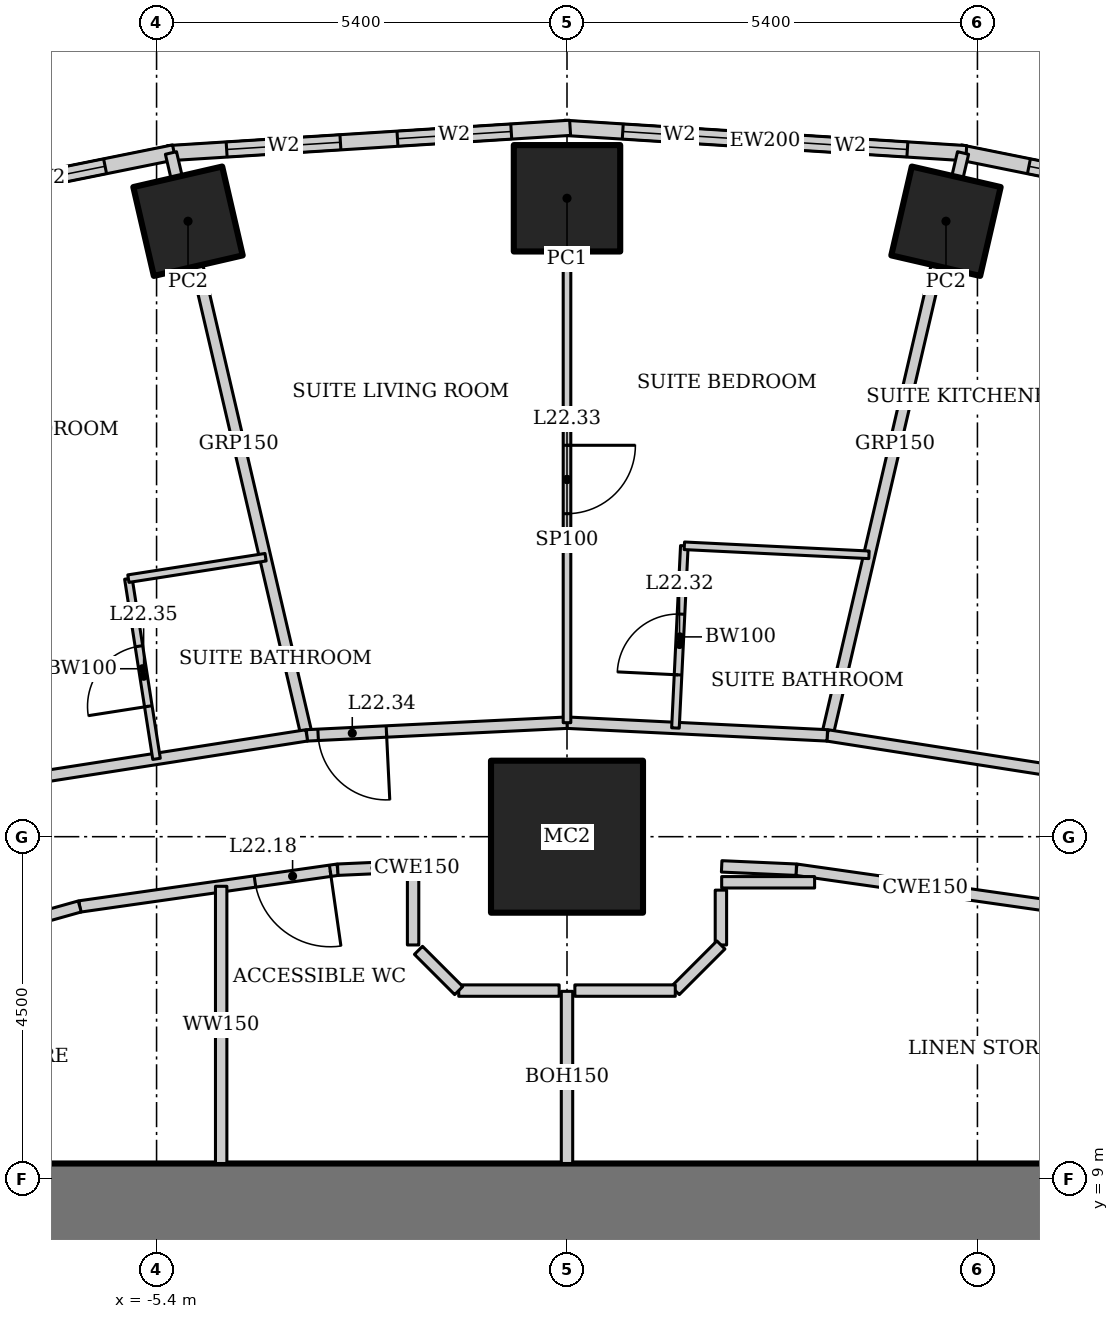
"""IFC4 building model, lengths in metres.
Left out: names, types, materials, properties, quantities, classifications, styles, units other than length and angle.
Written with IfcOpenShell. Run it as: python <this file> out.ifc"""

import sys

from ifc_helpers import new_model, si_unit, direction, frame, frame_2d, origin, origin_2d, place, context, subcontext, project, spatial, rectangle, hollow_rectangle, extrude, element, fill, save


model = new_model("IFC4")
c1 = context("Model", 3, precision=1e-05, world=origin(), true_north=direction((0.0, 1.0)))
c2 = subcontext(c1, "Body", "Model", "MODEL_VIEW")
j1 = project(units=[si_unit("LENGTHUNIT", "METRE"), si_unit("PLANEANGLEUNIT", "RADIAN")], contexts=[c1])
p1 = place(None, origin())
s1 = spatial("IfcSite", under=j1, at=p1, CompositionType="ELEMENT")
p2 = place(p1, origin())
s2 = spatial("IfcBuilding", under=s1, at=p2, CompositionType="ELEMENT")
p3 = place(p2, frame((0.0, 0.0, 94.6)))
s3 = spatial("IfcBuildingStorey", under=s2, at=p3, CompositionType="ELEMENT", Elevation=94.6)
p4 = place(p3, frame((0.0, 13.5, 0.0), z_axis=(0.0, 0.0, 1.0), x_axis=(1.0, 0.0, 0.0)))
e1 = element("IfcColumn", 1, at=p4, inside=s3, PredefinedType="COLUMN", context=c2, shape_type="SweptSolid", body=[
    extrude(hollow_rectangle(XDim=2.0, YDim=2.0, WallThickness=0.17, at=origin_2d()), origin(), (0.0, 0.0, 1.0), 3.6),
])
p5 = place(p3, frame((4.986, 21.598, 0.0), z_axis=(0.0, 0.0, 1.0), x_axis=(0.224951054344, 0.974370064785, 0.0)))
e2 = element("IfcColumn", 2, at=p5, inside=s3, PredefinedType="COLUMN", context=c2, shape_type="SweptSolid", body=[
    extrude(hollow_rectangle(XDim=1.2, YDim=1.2, WallThickness=0.1, at=origin_2d()), origin(), (0.0, 0.0, 1.0), 3.6),
])
p6 = place(p3, frame((0.0, 21.9, 0.0), z_axis=(0.0, 0.0, 1.0), x_axis=(1.0, 0.0, 0.0)))
e3 = element("IfcColumn", 3, at=p6, inside=s3, PredefinedType="COLUMN", context=c2, shape_type="SweptSolid", body=[
    extrude(hollow_rectangle(XDim=1.4, YDim=1.4, WallThickness=0.1, at=origin_2d()), origin(), (0.0, 0.0, 1.0), 3.6),
])
p7 = place(p3, frame((-4.986, 21.598, 0.0), z_axis=(0.0, 0.0, 1.0), x_axis=(0.974370064785, 0.224951054344, 0.0)))
e4 = element("IfcColumn", 4, at=p7, inside=s3, PredefinedType="COLUMN", context=c2, shape_type="SweptSolid", body=[
    extrude(hollow_rectangle(XDim=1.2, YDim=1.2, WallThickness=0.1, at=origin_2d()), origin(), (0.0, 0.0, 1.0), 3.6),
])
p8 = place(p3, frame((12.2, 8.0, 0.0), z_axis=(0.0, 0.0, 1.0), x_axis=(-1.0, 0.0, 0.0)))
e5 = element("IfcWall", 5, at=p8, inside=s3, PredefinedType="SHEAR", context=c2, shape_type="SweptSolid", body=[
    extrude(rectangle(XDim=24.4, YDim=2.4, at=frame_2d((12.2, 0.0))), origin(), (0.0, 0.0, 1.0), 3.6),
])
p9 = place(p3, frame((10.957, 21.337, 0.0), z_axis=(0.0, 0.0, 1.0), x_axis=(-0.980251657452, 0.197754110105, 0.0)))
e6 = element("IfcWall", 6, at=p9, inside=s3, PredefinedType="SOLIDWALL", context=c2, shape_type="SweptSolid", body=[
    extrude(rectangle(XDim=5.904, YDim=0.2, at=frame_2d((2.952, 0.0))), origin(), (0.0, 0.0, 1.0), 3.45),
])
p10 = place(p9, frame((0.926, 0.0, 0.5)))
e7 = element("IfcOpeningElement", 7, at=p10, cuts=e6, PredefinedType="OPENING", context=c2, shape_type="SweptSolid", body=[
    extrude(rectangle(XDim=1.5, YDim=2.2, at=frame_2d((0.75, 1.1))), frame((0.0, 0.11, 0.0), z_axis=(0.0, -1.0, 0.0), x_axis=(1.0, 0.0, 0.0)), (0.0, 0.0, 1.0), 0.22),
])
p11 = place(p9, frame((3.478, 0.0, 0.5)))
e8 = element("IfcOpeningElement", 8, at=p11, cuts=e6, PredefinedType="OPENING", context=c2, shape_type="SweptSolid", body=[
    extrude(rectangle(XDim=1.5, YDim=2.2, at=frame_2d((0.75, 1.1))), frame((0.0, 0.11, 0.0), z_axis=(0.0, -1.0, 0.0), x_axis=(1.0, 0.0, 0.0)), (0.0, 0.0, 1.0), 0.22),
])
p12 = place(p3, frame((5.253, 22.493, 0.0), z_axis=(0.0, 0.0, 1.0), x_axis=(-0.998018582375, 0.062919863585, 0.0)))
e9 = element("IfcWall", 9, at=p12, inside=s3, PredefinedType="SOLIDWALL", context=c2, shape_type="SweptSolid", body=[
    extrude(rectangle(XDim=5.304, YDim=0.2, at=frame_2d((2.652, 0.0))), origin(), (0.0, 0.0, 1.0), 3.45),
])
p13 = place(p12, frame((0.776, 0.0, 0.5)))
e10 = element("IfcOpeningElement", 10, at=p13, cuts=e9, PredefinedType="OPENING", context=c2, shape_type="SweptSolid", body=[
    extrude(rectangle(XDim=1.5, YDim=2.2, at=frame_2d((0.75, 1.1))), frame((0.0, 0.11, 0.0), z_axis=(0.0, -1.0, 0.0), x_axis=(1.0, 0.0, 0.0)), (0.0, 0.0, 1.0), 0.22),
])
p14 = place(p12, frame((3.028, 0.0, 0.5)))
e11 = element("IfcOpeningElement", 11, at=p14, cuts=e9, PredefinedType="OPENING", context=c2, shape_type="SweptSolid", body=[
    extrude(rectangle(XDim=1.5, YDim=2.2, at=frame_2d((0.75, 1.1))), frame((0.0, 0.11, 0.0), z_axis=(0.0, -1.0, 0.0), x_axis=(1.0, 0.0, 0.0)), (0.0, 0.0, 1.0), 0.22),
])
p15 = place(p3, frame((0.041, 22.827, 0.0), z_axis=(0.0, 0.0, 1.0), x_axis=(-0.998018582375, -0.062919863585, 0.0)))
e12 = element("IfcWall", 12, at=p15, inside=s3, PredefinedType="SOLIDWALL", context=c2, shape_type="SweptSolid", body=[
    extrude(rectangle(XDim=5.304, YDim=0.2, at=frame_2d((2.652, 0.0))), origin(), (0.0, 0.0, 1.0), 3.45),
])
p16 = place(p15, frame((0.776, 0.0, 0.5)))
e13 = element("IfcOpeningElement", 13, at=p16, cuts=e12, PredefinedType="OPENING", context=c2, shape_type="SweptSolid", body=[
    extrude(rectangle(XDim=1.5, YDim=2.2, at=frame_2d((0.75, 1.1))), frame((0.0, 0.11, 0.0), z_axis=(0.0, -1.0, 0.0), x_axis=(1.0, 0.0, 0.0)), (0.0, 0.0, 1.0), 0.22),
])
p17 = place(p15, frame((3.028, 0.0, 0.5)))
e14 = element("IfcOpeningElement", 14, at=p17, cuts=e12, PredefinedType="OPENING", context=c2, shape_type="SweptSolid", body=[
    extrude(rectangle(XDim=1.5, YDim=2.2, at=frame_2d((0.75, 1.1))), frame((0.0, 0.11, 0.0), z_axis=(0.0, -1.0, 0.0), x_axis=(1.0, 0.0, 0.0)), (0.0, 0.0, 1.0), 0.22),
])
p18 = place(p3, frame((-5.17, 22.504, 0.0), z_axis=(0.0, 0.0, 1.0), x_axis=(-0.980251657452, -0.197754110105, 0.0)))
e15 = element("IfcWall", 15, at=p18, inside=s3, PredefinedType="SOLIDWALL", context=c2, shape_type="SweptSolid", body=[
    extrude(rectangle(XDim=5.904, YDim=0.2, at=frame_2d((2.952, 0.0))), origin(), (0.0, 0.0, 1.0), 3.45),
])
p19 = place(p18, frame((0.926, 0.0, 0.5)))
e16 = element("IfcOpeningElement", 16, at=p19, cuts=e15, PredefinedType="OPENING", context=c2, shape_type="SweptSolid", body=[
    extrude(rectangle(XDim=1.5, YDim=2.2, at=frame_2d((0.75, 1.1))), frame((0.0, 0.11, 0.0), z_axis=(0.0, -1.0, 0.0), x_axis=(1.0, 0.0, 0.0)), (0.0, 0.0, 1.0), 0.22),
])
p20 = place(p18, frame((3.478, 0.0, 0.5)))
e17 = element("IfcOpeningElement", 17, at=p20, cuts=e15, PredefinedType="OPENING", context=c2, shape_type="SweptSolid", body=[
    extrude(rectangle(XDim=1.5, YDim=2.2, at=frame_2d((0.75, 1.1))), frame((0.0, 0.11, 0.0), z_axis=(0.0, -1.0, 0.0), x_axis=(1.0, 0.0, 0.0)), (0.0, 0.0, 1.0), 0.22),
])
for number, where, z_axis, x_axis in (
    (18, (5.211, 22.496, 0.0), (0.0, 0.0, 1.0), (-0.227, -0.974, 0.0)),
    (19, (-5.211, 22.496, 0.0), (0.0, 0.0, 1.0), (0.227, -0.974, 0.0)),
):
    element("IfcWall", number, at=place(p3, frame(where, z_axis=z_axis, x_axis=x_axis)), inside=s3, PredefinedType="PARTITIONING", context=c2, shape_type="SweptSolid", body=[
        extrude(rectangle(XDim=7.869, YDim=0.15, at=frame_2d((3.934, 0.0))), origin(), (0.0, 0.0, 1.0), 2.767),
    ])
p21 = place(p3, frame((7.253, 14.235, 0.0), z_axis=(0.0, 0.0, 1.0), x_axis=(-0.988015036573, 0.154357660987, 0.0)))
e20 = element("IfcWall", 20, at=p21, inside=s3, PredefinedType="PARTITIONING", context=c2, shape_type="SweptSolid", body=[
    extrude(rectangle(XDim=3.875, YDim=0.15, at=frame_2d((1.938, 0.0))), origin(), (0.0, 0.0, 1.0), 3.45),
])
p22 = place(p3, frame((3.424, 14.833, 0.0), z_axis=(0.0, 0.0, 1.0), x_axis=(-0.998809560203, 0.048779733975, 0.0)))
e21 = element("IfcWall", 21, at=p22, inside=s3, PredefinedType="PARTITIONING", context=c2, shape_type="SweptSolid", body=[
    extrude(rectangle(XDim=3.428, YDim=0.15, at=frame_2d((1.714, 0.0))), origin(), (0.0, 0.0, 1.0), 3.45),
])
p23 = place(p3, frame((0.0, 15.0, 0.0), z_axis=(0.0, 0.0, 1.0), x_axis=(-0.998809560203, -0.048779733975, 0.0)))
e22 = element("IfcWall", 22, at=p23, inside=s3, PredefinedType="PARTITIONING", context=c2, shape_type="SweptSolid", body=[
    extrude(rectangle(XDim=3.428, YDim=0.15, at=frame_2d((1.714, 0.0))), origin(), (0.0, 0.0, 1.0), 3.45),
])
p24 = place(p23, frame((2.378, 0.0, 0.0)))
e23 = element("IfcOpeningElement", 23, at=p24, cuts=e22, PredefinedType="OPENING", context=c2, shape_type="SweptSolid", body=[
    extrude(rectangle(XDim=0.9, YDim=2.1, at=frame_2d((0.45, 1.05))), frame((0.0, 0.085, 0.0), z_axis=(0.0, -1.0, 0.0), x_axis=(1.0, 0.0, 0.0)), (0.0, 0.0, 1.0), 0.17),
])
p25 = place(p3, frame((-3.424, 14.833, 0.0), z_axis=(0.0, 0.0, 1.0), x_axis=(-0.988015036573, -0.154357660987, 0.0)))
e24 = element("IfcWall", 24, at=p25, inside=s3, PredefinedType="PARTITIONING", context=c2, shape_type="SweptSolid", body=[
    extrude(rectangle(XDim=3.875, YDim=0.15, at=frame_2d((1.938, 0.0))), origin(), (0.0, 0.0, 1.0), 3.45),
])
p26 = place(p3, frame((6.411, 12.582, 0.0), z_axis=(0.0, 0.0, 1.0), x_axis=(-0.990002114939, 0.14105251652, 0.0)))
e25 = element("IfcWall", 25, at=p26, inside=s3, PredefinedType="PARTITIONING", context=c2, shape_type="SweptSolid", body=[
    extrude(rectangle(XDim=3.429, YDim=0.15, at=frame_2d((1.714, 0.0))), origin(), (0.0, 0.0, 1.0), 3.45),
])
p27 = place(p3, frame((-3.016, 13.066, 0.0), z_axis=(0.0, 0.0, 1.0), x_axis=(-0.990002114939, -0.14105251652, 0.0)))
e26 = element("IfcWall", 26, at=p27, inside=s3, PredefinedType="PARTITIONING", context=c2, shape_type="SweptSolid", body=[
    extrude(rectangle(XDim=3.429, YDim=0.15, at=frame_2d((1.714, 0.0))), origin(), (0.0, 0.0, 1.0), 3.45),
])
p28 = place(p27, frame((0.1, 0.0, 0.0)))
e27 = element("IfcOpeningElement", 27, at=p28, cuts=e26, PredefinedType="OPENING", context=c2, shape_type="SweptSolid", body=[
    extrude(rectangle(XDim=1.0, YDim=2.1, at=frame_2d((0.5, 1.05))), frame((0.0, 0.085, 0.0), z_axis=(0.0, -1.0, 0.0), x_axis=(1.0, 0.0, 0.0)), (0.0, 0.0, 1.0), 0.17),
])
p29 = place(p3, frame((-6.411, 12.582, 0.0), z_axis=(0.0, 0.0, 1.0), x_axis=(-0.962643729928, -0.270771211967, 0.0)))
e28 = element("IfcWall", 28, at=p29, inside=s3, PredefinedType="PARTITIONING", context=c2, shape_type="SweptSolid", body=[
    extrude(rectangle(XDim=4.688, YDim=0.15, at=frame_2d((2.344, 0.0))), origin(), (0.0, 0.0, 1.0), 3.45),
])
p30 = place(p29, frame((1.894, 0.0, 0.0)))
e29 = element("IfcOpeningElement", 29, at=p30, cuts=e28, PredefinedType="OPENING", context=c2, shape_type="SweptSolid", body=[
    extrude(rectangle(XDim=0.9, YDim=2.1, at=frame_2d((0.45, 1.05))), frame((0.0, 0.085, 0.0), z_axis=(0.0, -1.0, 0.0), x_axis=(1.0, 0.0, 0.0)), (0.0, 0.0, 1.0), 0.17),
])
p31 = place(p3, frame((-4.55, 9.2, 0.0), z_axis=(0.0, 0.0, 1.0), x_axis=(0.0, 1.0, 0.0)))
e30 = element("IfcWall", 30, at=p31, inside=s3, PredefinedType="SOLIDWALL", context=c2, shape_type="SweptSolid", body=[
    extrude(rectangle(XDim=3.647, YDim=0.15, at=frame_2d((1.824, 0.0))), origin(), (0.0, 0.0, 1.0), 3.45),
])
p32 = place(p3, frame((1.427, 14.93, 0.0), z_axis=(0.0, 0.0, 1.0), x_axis=(0.048831470304, 0.998807032168, 0.0)))
e31 = element("IfcWall", 31, at=p32, inside=s3, PredefinedType="PARTITIONING", context=c2, shape_type="SweptSolid", body=[
    extrude(rectangle(XDim=2.4, YDim=0.1, at=frame_2d((1.2, 0.0))), origin(), (0.0, 0.0, 1.0), 3.45),
])
p33 = place(p32, frame((0.7, 0.0, 0.0)))
e32 = element("IfcOpeningElement", 32, at=p33, cuts=e31, PredefinedType="OPENING", context=c2, shape_type="SweptSolid", body=[
    extrude(rectangle(XDim=0.8, YDim=2.1, at=frame_2d((0.4, 1.05))), frame((0.0, 0.06, 0.0), z_axis=(0.0, -1.0, 0.0), x_axis=(1.0, 0.0, 0.0)), (0.0, 0.0, 1.0), 0.12),
])
p34 = place(p3, frame((1.544, 17.327, 0.0), z_axis=(0.0, 0.0, 1.0), x_axis=(0.998813899717, -0.048690797202, 0.0)))
e33 = element("IfcWall", 33, at=p34, inside=s3, PredefinedType="PARTITIONING", context=c2, shape_type="SweptSolid", body=[
    extrude(rectangle(XDim=2.432, YDim=0.1, at=frame_2d((1.216, 0.0))), origin(), (0.0, 0.0, 1.0), 3.45),
])
p35 = place(p3, frame((0.0, 21.4, 0.0), z_axis=(0.0, 0.0, 1.0), x_axis=(0.0, -1.0, 0.0)))
e34 = element("IfcWall", 34, at=p35, inside=s3, PredefinedType="PARTITIONING", context=c2, shape_type="SweptSolid", body=[
    extrude(rectangle(XDim=6.4, YDim=0.1, at=frame_2d((3.2, 0.0))), origin(), (0.0, 0.0, 1.0), 2.924),
])
p36 = place(p35, frame((2.75, 0.0, 0.0)))
e35 = element("IfcOpeningElement", 35, at=p36, cuts=e34, PredefinedType="OPENING", context=c2, shape_type="SweptSolid", body=[
    extrude(rectangle(XDim=0.9, YDim=2.1, at=frame_2d((0.45, 1.05))), frame((0.0, 0.06, 0.0), z_axis=(0.0, -1.0, 0.0), x_axis=(1.0, 0.0, 0.0)), (0.0, 0.0, 1.0), 0.12),
])
p37 = place(p3, frame((-5.4, 14.524, 0.0), z_axis=(0.0, 0.0, 1.0), x_axis=(-0.154426532979, 0.988004274238, 0.0)))
e36 = element("IfcWall", 36, at=p37, inside=s3, PredefinedType="PARTITIONING", context=c2, shape_type="SweptSolid", body=[
    extrude(rectangle(XDim=2.4, YDim=0.1, at=frame_2d((1.2, 0.0))), origin(), (0.0, 0.0, 1.0), 3.45),
])
p38 = place(p37, frame((0.7, 0.0, 0.0)))
e37 = element("IfcOpeningElement", 37, at=p38, cuts=e36, PredefinedType="OPENING", context=c2, shape_type="SweptSolid", body=[
    extrude(rectangle(XDim=0.8, YDim=2.1, at=frame_2d((0.4, 1.05))), frame((0.0, 0.06, 0.0), z_axis=(0.0, -1.0, 0.0), x_axis=(1.0, 0.0, 0.0)), (0.0, 0.0, 1.0), 0.12),
])
p39 = place(p3, frame((-5.771, 16.895, 0.0), z_axis=(0.0, 0.0, 1.0), x_axis=(0.98801840204, 0.154336117711, 0.0)))
e38 = element("IfcWall", 38, at=p39, inside=s3, PredefinedType="PARTITIONING", context=c2, shape_type="SweptSolid", body=[
    extrude(rectangle(XDim=1.827, YDim=0.1, at=frame_2d((0.914, 0.0))), origin(), (0.0, 0.0, 1.0), 3.45),
])
for number, where, z_axis, x_axis in (
    (39, (3.016, 13.066, 0.0), (0.0, 0.0, 1.0), (-0.999, 0.044, 0.0)),
    (40, (-2.035, 13.109, 0.0), (0.0, 0.0, 1.0), (-0.999, -0.044, 0.0)),
):
    element("IfcWall", number, at=place(p3, frame(where, z_axis=z_axis, x_axis=x_axis)), inside=s3, PredefinedType="PARTITIONING", context=c2, shape_type="SweptSolid", body=[
        extrude(rectangle(XDim=0.982, YDim=0.15, at=frame_2d((0.491, 0.0))), origin(), (0.0, 0.0, 1.0), 3.45),
    ])
p40 = place(p3, frame((0.0, 9.2, 0.0), z_axis=(0.0, 0.0, 1.0), x_axis=(0.0, 1.0, 0.0)))
e41 = element("IfcWall", 41, at=p40, inside=s3, PredefinedType="PARTITIONING", context=c2, shape_type="SweptSolid", body=[
    extrude(rectangle(XDim=2.265, YDim=0.15, at=frame_2d((1.133, 0.0))), origin(), (0.0, 0.0, 1.0), 3.043),
])
p41 = place(p3, frame((3.258, 12.9, 0.0), z_axis=(0.0, 0.0, 1.0), x_axis=(-1.0, 0.0, 0.0)))
e42 = element("IfcWall", 42, at=p41, inside=s3, PredefinedType="PARTITIONING", context=c2, shape_type="SweptSolid", body=[
    extrude(rectangle(XDim=1.223, YDim=0.15, at=frame_2d((0.611, 0.0))), origin(), (0.0, 0.0, 1.0), 3.45),
])
p42 = place(p3, frame((2.025, 12.797, 0.0), z_axis=(0.0, 0.0, 1.0), x_axis=(0.0, -1.0, 0.0)))
e43 = element("IfcWall", 43, at=p42, inside=s3, PredefinedType="PARTITIONING", context=c2, shape_type="SweptSolid", body=[
    extrude(rectangle(XDim=0.721, YDim=0.15, at=frame_2d((0.361, 0.0))), origin(), (0.0, 0.0, 1.0), 2.749),
])
p43 = place(p3, frame((2.025, 12.075, 0.0), z_axis=(0.0, 0.0, 1.0), x_axis=(-0.707106781187, -0.707106781187, 0.0)))
e44 = element("IfcWall", 44, at=p43, inside=s3, PredefinedType="PARTITIONING", context=c2, shape_type="SweptSolid", body=[
    extrude(rectangle(XDim=0.849, YDim=0.15, at=frame_2d((0.425, 0.0))), origin(), (0.0, 0.0, 1.0), 3.45),
])
p44 = place(p3, frame((1.425, 11.475, 0.0), z_axis=(0.0, 0.0, 1.0), x_axis=(-1.0, 0.0, 0.0)))
e45 = element("IfcWall", 45, at=p44, inside=s3, PredefinedType="PARTITIONING", context=c2, shape_type="SweptSolid", body=[
    extrude(rectangle(XDim=1.321, YDim=0.15, at=frame_2d((0.661, 0.0))), origin(), (0.0, 0.0, 1.0), 3.45),
])
p45 = place(p3, frame((-2.025, 12.075, 0.0), z_axis=(0.0, 0.0, 1.0), x_axis=(0.0, 1.0, 0.0)))
e46 = element("IfcWall", 46, at=p45, inside=s3, PredefinedType="PARTITIONING", context=c2, shape_type="SweptSolid", body=[
    extrude(rectangle(XDim=0.93, YDim=0.15, at=frame_2d((0.465, 0.0))), origin(), (0.0, 0.0, 1.0), 2.749),
])
p46 = place(p3, frame((-0.103, 11.475, 0.0), z_axis=(0.0, 0.0, 1.0), x_axis=(-1.0, 0.0, 0.0)))
e47 = element("IfcWall", 47, at=p46, inside=s3, PredefinedType="PARTITIONING", context=c2, shape_type="SweptSolid", body=[
    extrude(rectangle(XDim=1.321, YDim=0.15, at=frame_2d((0.661, 0.0))), origin(), (0.0, 0.0, 1.0), 3.45),
])
p47 = place(p3, frame((-1.425, 11.475, 0.0), z_axis=(0.0, 0.0, 1.0), x_axis=(-0.707269727782, 0.706943797032, 0.0)))
e48 = element("IfcWall", 48, at=p47, inside=s3, PredefinedType="PARTITIONING", context=c2, shape_type="SweptSolid", body=[
    extrude(rectangle(XDim=0.749, YDim=0.15, at=frame_2d((0.375, 0.0))), origin(), (0.0, 0.0, 1.0), 3.45),
])
p48 = place(p11, origin())
e49 = element("IfcWindow", 49, at=p48, inside=s3, PartitioningType="SINGLE_PANEL", PredefinedType="WINDOW", context=c2, shape_type="SweptSolid", body=[
    extrude(rectangle(XDim=1.5, YDim=2.2, at=frame_2d((0.75, 1.1))), frame((0.0, 0.03, 0.0), z_axis=(0.0, -1.0, 0.0), x_axis=(1.0, 0.0, 0.0)), (0.0, 0.0, 1.0), 0.06),
])
fill(e8, e49)
p49 = place(p13, origin())
e50 = element("IfcWindow", 50, at=p49, inside=s3, PartitioningType="SINGLE_PANEL", PredefinedType="WINDOW", context=c2, shape_type="SweptSolid", body=[
    extrude(rectangle(XDim=1.5, YDim=2.2, at=frame_2d((0.75, 1.1))), frame((0.0, 0.03, 0.0), z_axis=(0.0, -1.0, 0.0), x_axis=(1.0, 0.0, 0.0)), (0.0, 0.0, 1.0), 0.06),
])
fill(e10, e50)
p50 = place(p14, origin())
e51 = element("IfcWindow", 51, at=p50, inside=s3, PartitioningType="SINGLE_PANEL", PredefinedType="WINDOW", context=c2, shape_type="SweptSolid", body=[
    extrude(rectangle(XDim=1.5, YDim=2.2, at=frame_2d((0.75, 1.1))), frame((0.0, 0.03, 0.0), z_axis=(0.0, -1.0, 0.0), x_axis=(1.0, 0.0, 0.0)), (0.0, 0.0, 1.0), 0.06),
])
fill(e11, e51)
p51 = place(p16, origin())
e52 = element("IfcWindow", 52, at=p51, inside=s3, PartitioningType="SINGLE_PANEL", PredefinedType="WINDOW", context=c2, shape_type="SweptSolid", body=[
    extrude(rectangle(XDim=1.5, YDim=2.2, at=frame_2d((0.75, 1.1))), frame((0.0, 0.03, 0.0), z_axis=(0.0, -1.0, 0.0), x_axis=(1.0, 0.0, 0.0)), (0.0, 0.0, 1.0), 0.06),
])
fill(e13, e52)
p52 = place(p17, origin())
e53 = element("IfcWindow", 53, at=p52, inside=s3, PartitioningType="SINGLE_PANEL", PredefinedType="WINDOW", context=c2, shape_type="SweptSolid", body=[
    extrude(rectangle(XDim=1.5, YDim=2.2, at=frame_2d((0.75, 1.1))), frame((0.0, 0.03, 0.0), z_axis=(0.0, -1.0, 0.0), x_axis=(1.0, 0.0, 0.0)), (0.0, 0.0, 1.0), 0.06),
])
fill(e14, e53)
p53 = place(p19, origin())
e54 = element("IfcWindow", 54, at=p53, inside=s3, PartitioningType="SINGLE_PANEL", PredefinedType="WINDOW", context=c2, shape_type="SweptSolid", body=[
    extrude(rectangle(XDim=1.5, YDim=2.2, at=frame_2d((0.75, 1.1))), frame((0.0, 0.03, 0.0), z_axis=(0.0, -1.0, 0.0), x_axis=(1.0, 0.0, 0.0)), (0.0, 0.0, 1.0), 0.06),
])
fill(e16, e54)
p54 = place(p28, origin())
e55 = element("IfcDoor", 55, at=p54, inside=s3, OperationType="SINGLE_SWING_LEFT", PredefinedType="DOOR", context=c2, shape_type="SweptSolid", body=[
    extrude(rectangle(XDim=1.0, YDim=2.1, at=frame_2d((0.5, 1.05))), frame((0.0, 0.025, 0.0), z_axis=(0.0, -1.0, 0.0), x_axis=(1.0, 0.0, 0.0)), (0.0, 0.0, 1.0), 0.05),
])
fill(e27, e55)
p55 = place(p33, origin())
e56 = element("IfcDoor", 56, at=p55, inside=s3, OperationType="SINGLE_SWING_LEFT", PredefinedType="DOOR", context=c2, shape_type="SweptSolid", body=[
    extrude(rectangle(XDim=0.8, YDim=2.1, at=frame_2d((0.4, 1.05))), frame((0.0, 0.025, 0.0), z_axis=(0.0, -1.0, 0.0), x_axis=(1.0, 0.0, 0.0)), (0.0, 0.0, 1.0), 0.05),
])
fill(e32, e56)
p56 = place(p36, origin())
e57 = element("IfcDoor", 57, at=p56, inside=s3, OperationType="SINGLE_SWING_LEFT", PredefinedType="DOOR", context=c2, shape_type="SweptSolid", body=[
    extrude(rectangle(XDim=0.9, YDim=2.1, at=frame_2d((0.45, 1.05))), frame((0.0, 0.025, 0.0), z_axis=(0.0, -1.0, 0.0), x_axis=(1.0, 0.0, 0.0)), (0.0, 0.0, 1.0), 0.05),
])
fill(e35, e57)
p57 = place(p24, origin())
e58 = element("IfcDoor", 58, at=p57, inside=s3, OperationType="SINGLE_SWING_LEFT", PredefinedType="DOOR", context=c2, shape_type="SweptSolid", body=[
    extrude(rectangle(XDim=0.9, YDim=2.1, at=frame_2d((0.45, 1.05))), frame((0.0, 0.025, 0.0), z_axis=(0.0, -1.0, 0.0), x_axis=(1.0, 0.0, 0.0)), (0.0, 0.0, 1.0), 0.05),
])
fill(e23, e58)
p58 = place(p38, origin())
e59 = element("IfcDoor", 59, at=p58, inside=s3, OperationType="SINGLE_SWING_LEFT", PredefinedType="DOOR", context=c2, shape_type="SweptSolid", body=[
    extrude(rectangle(XDim=0.8, YDim=2.1, at=frame_2d((0.4, 1.05))), frame((0.0, 0.025, 0.0), z_axis=(0.0, -1.0, 0.0), x_axis=(1.0, 0.0, 0.0)), (0.0, 0.0, 1.0), 0.05),
])
fill(e37, e59)
save(model, sys.argv[1])
